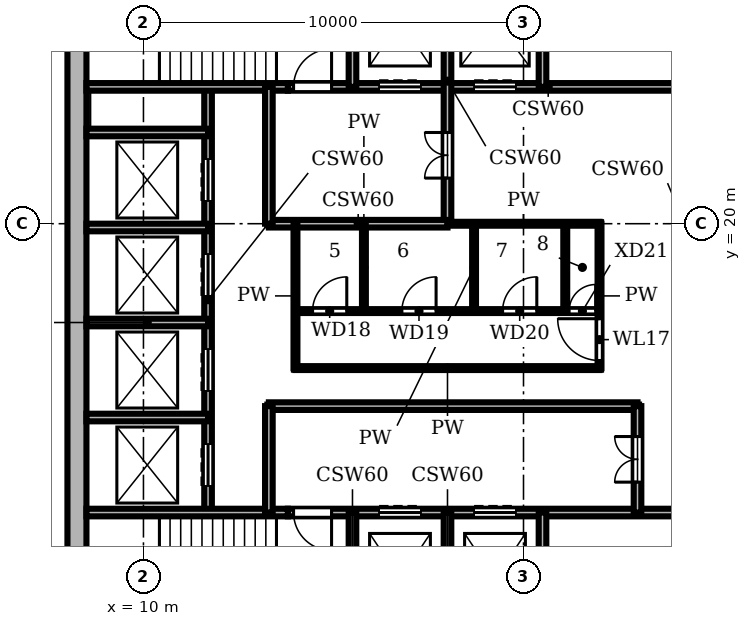
"""IFC4 building model, lengths in metres.
Left out: names, types, materials, properties, quantities, classifications, styles, units other than length and angle.
Written with IfcOpenShell. Run it as: python <this file> out.ifc"""

import sys

from ifc_helpers import new_model, si_unit, direction, frame, frame_2d, origin, place, context, subcontext, project, spatial, rectangle, extrude, element, fill, save


model = new_model("IFC4")
c1 = context("Model", 3, precision=1e-05, world=origin(), true_north=direction((0.0, 1.0)))
c2 = subcontext(c1, "Body", "Model", "MODEL_VIEW")
j1 = project(units=[si_unit("LENGTHUNIT", "METRE"), si_unit("PLANEANGLEUNIT", "RADIAN")], contexts=[c1])
p1 = place(None, origin())
s1 = spatial("IfcSite", under=j1, at=p1, CompositionType="ELEMENT")
p2 = place(p1, origin())
s2 = spatial("IfcBuilding", under=s1, at=p2, CompositionType="ELEMENT")
p3 = place(p2, frame((0.0, 0.0, 313.8)))
s3 = spatial("IfcBuildingStorey", under=s2, at=p3, CompositionType="ELEMENT", Elevation=313.8)
p4 = place(p3, frame((8.25, 27.5, 0.0), z_axis=(0.0, 0.0, 1.0), x_axis=(0.0, -1.0, 0.0)))
e1 = element("IfcWall", 1, at=p4, inside=s3, PredefinedType="SHEAR", context=c2, shape_type="SweptSolid", body=[
    extrude(rectangle(XDim=19.0, YDim=0.5, at=frame_2d((9.5, 0.0))), origin(), (0.0, 0.0, 1.0), 3.9),
])
p5 = place(p3, frame((8.5, 12.4, 0.0), z_axis=(0.0, 0.0, 1.0), x_axis=(1.0, 0.0, 0.0)))
e2 = element("IfcWall", 2, at=p5, inside=s3, PredefinedType="SHEAR", context=c2, shape_type="SweptSolid", body=[
    extrude(rectangle(XDim=5.3, YDim=0.2, at=frame_2d((2.65, 0.0))), origin(), (0.0, 0.0, 1.0), 3.58),
])
p6 = place(p3, frame((13.8, 12.4, 0.0), z_axis=(0.0, 0.0, 1.0), x_axis=(1.0, 0.0, 0.0)))
e3 = element("IfcWall", 3, at=p6, inside=s3, PredefinedType="SHEAR", context=c2, shape_type="SweptSolid", body=[
    extrude(rectangle(XDim=13.7, YDim=0.2, at=frame_2d((6.85, 0.0))), origin(), (0.0, 0.0, 1.0), 3.58),
])
p7 = place(p6, frame((2.4, 0.0, 0.0)))
e4 = element("IfcOpeningElement", 4, at=p7, cuts=e3, PredefinedType="OPENING", context=c2, shape_type="SweptSolid", body=[
    extrude(rectangle(XDim=1.1, YDim=2.1, at=frame_2d((0.55, 1.05))), frame((0.0, 0.11, 0.0), z_axis=(0.0, -1.0, 0.0), x_axis=(1.0, 0.0, 0.0)), (0.0, 0.0, 1.0), 0.22),
])
p8 = place(p6, frame((4.9, 0.0, 0.0)))
e5 = element("IfcOpeningElement", 5, at=p8, cuts=e3, PredefinedType="OPENING", context=c2, shape_type="SweptSolid", body=[
    extrude(rectangle(XDim=1.1, YDim=2.1, at=frame_2d((0.55, 1.05))), frame((0.0, 0.11, 0.0), z_axis=(0.0, -1.0, 0.0), x_axis=(1.0, 0.0, 0.0)), (0.0, 0.0, 1.0), 0.22),
])
p9 = place(p6, frame((0.15, 0.0, 0.0)))
e6 = element("IfcOpeningElement", 6, at=p9, cuts=e3, PredefinedType="OPENING", context=c2, shape_type="SweptSolid", body=[
    extrude(rectangle(XDim=1.0, YDim=2.1, at=frame_2d((0.5, 1.05))), frame((0.0, 0.11, 0.0), z_axis=(0.0, -1.0, 0.0), x_axis=(1.0, 0.0, 0.0)), (0.0, 0.0, 1.0), 0.22),
])
p10 = place(p3, frame((8.5, 14.9, 0.0), z_axis=(0.0, 0.0, 1.0), x_axis=(1.0, 0.0, 0.0)))
e7 = element("IfcWall", 7, at=p10, inside=s3, PredefinedType="SHEAR", context=c2, shape_type="SweptSolid", body=[
    extrude(rectangle(XDim=3.2, YDim=0.2, at=frame_2d((1.6, 0.0))), origin(), (0.0, 0.0, 1.0), 3.58),
])
p11 = place(p3, frame((13.3, 15.2, 0.0), z_axis=(0.0, 0.0, 1.0), x_axis=(1.0, 0.0, 0.0)))
e8 = element("IfcWall", 8, at=p11, inside=s3, PredefinedType="SHEAR", context=c2, shape_type="SweptSolid", body=[
    extrude(rectangle(XDim=9.7, YDim=0.2, at=frame_2d((4.85, 0.0))), origin(), (0.0, 0.0, 1.0), 3.58),
])
p12 = place(p3, frame((14.0, 16.2, 0.0), z_axis=(0.0, 0.0, 1.0), x_axis=(1.0, 0.0, 0.0)))
e9 = element("IfcWall", 9, at=p12, inside=s3, PredefinedType="PARTITIONING", context=c2, shape_type="SweptSolid", body=[
    extrude(rectangle(XDim=8.0, YDim=0.1, at=frame_2d((4.0, 0.0))), origin(), (0.0, 0.0, 1.0), 3.58),
])
p13 = place(p3, frame((8.5, 17.4, 0.0), z_axis=(0.0, 0.0, 1.0), x_axis=(1.0, 0.0, 0.0)))
e10 = element("IfcWall", 10, at=p13, inside=s3, PredefinedType="SHEAR", context=c2, shape_type="SweptSolid", body=[
    extrude(rectangle(XDim=3.2, YDim=0.2, at=frame_2d((1.6, 0.0))), origin(), (0.0, 0.0, 1.0), 3.58),
])
p14 = place(p3, frame((14.0, 17.7, 0.0), z_axis=(0.0, 0.0, 1.0), x_axis=(1.0, 0.0, 0.0)))
e11 = element("IfcWall", 11, at=p14, inside=s3, PredefinedType="PARTITIONING", context=c2, shape_type="SweptSolid", body=[
    extrude(rectangle(XDim=8.0, YDim=0.1, at=frame_2d((4.0, 0.0))), origin(), (0.0, 0.0, 1.0), 3.58),
])
p15 = place(p14, frame((0.45, 0.0, 0.0)))
e12 = element("IfcOpeningElement", 12, at=p15, cuts=e11, PredefinedType="OPENING", context=c2, shape_type="SweptSolid", body=[
    extrude(rectangle(XDim=0.9, YDim=2.1, at=frame_2d((0.45, 1.05))), frame((0.0, 0.06, 0.0), z_axis=(0.0, -1.0, 0.0), x_axis=(1.0, 0.0, 0.0)), (0.0, 0.0, 1.0), 0.12),
])
p16 = place(p14, frame((2.8, 0.0, 0.0)))
e13 = element("IfcOpeningElement", 13, at=p16, cuts=e11, PredefinedType="OPENING", context=c2, shape_type="SweptSolid", body=[
    extrude(rectangle(XDim=0.9, YDim=2.1, at=frame_2d((0.45, 1.05))), frame((0.0, 0.06, 0.0), z_axis=(0.0, -1.0, 0.0), x_axis=(1.0, 0.0, 0.0)), (0.0, 0.0, 1.0), 0.12),
])
p17 = place(p14, frame((5.45, 0.0, 0.0)))
e14 = element("IfcOpeningElement", 14, at=p17, cuts=e11, PredefinedType="OPENING", context=c2, shape_type="SweptSolid", body=[
    extrude(rectangle(XDim=0.9, YDim=2.1, at=frame_2d((0.45, 1.05))), frame((0.0, 0.06, 0.0), z_axis=(0.0, -1.0, 0.0), x_axis=(1.0, 0.0, 0.0)), (0.0, 0.0, 1.0), 0.12),
])
p18 = place(p14, frame((7.2, 0.0, 0.0)))
e15 = element("IfcOpeningElement", 15, at=p18, cuts=e11, PredefinedType="OPENING", context=c2, shape_type="SweptSolid", body=[
    extrude(rectangle(XDim=0.7, YDim=2.1, at=frame_2d((0.35, 1.05))), frame((0.0, 0.06, 0.0), z_axis=(0.0, -1.0, 0.0), x_axis=(1.0, 0.0, 0.0)), (0.0, 0.0, 1.0), 0.12),
])
p19 = place(p3, frame((8.5, 19.9, 0.0), z_axis=(0.0, 0.0, 1.0), x_axis=(1.0, 0.0, 0.0)))
e16 = element("IfcWall", 16, at=p19, inside=s3, PredefinedType="SHEAR", context=c2, shape_type="SweptSolid", body=[
    extrude(rectangle(XDim=3.2, YDim=0.2, at=frame_2d((1.6, 0.0))), origin(), (0.0, 0.0, 1.0), 3.58),
])
p20 = place(p3, frame((18.0, 20.0, 0.0), z_axis=(0.0, 0.0, 1.0), x_axis=(1.0, 0.0, 0.0)))
e17 = element("IfcWall", 17, at=p20, inside=s3, PredefinedType="PARTITIONING", context=c2, shape_type="SweptSolid", body=[
    extrude(rectangle(XDim=4.0, YDim=0.1, at=frame_2d((2.0, 0.0))), origin(), (0.0, 0.0, 1.0), 3.58),
])
p21 = place(p3, frame((13.3, 20.0, 0.0), z_axis=(0.0, 0.0, 1.0), x_axis=(1.0, 0.0, 0.0)))
e18 = element("IfcWall", 18, at=p21, inside=s3, PredefinedType="SHEAR", context=c2, shape_type="SweptSolid", body=[
    extrude(rectangle(XDim=4.7, YDim=0.2, at=frame_2d((2.35, 0.0))), origin(), (0.0, 0.0, 1.0), 3.58),
])
p22 = place(p3, frame((8.5, 22.4, 0.0), z_axis=(0.0, 0.0, 1.0), x_axis=(1.0, 0.0, 0.0)))
e19 = element("IfcWall", 19, at=p22, inside=s3, PredefinedType="SHEAR", context=c2, shape_type="SweptSolid", body=[
    extrude(rectangle(XDim=3.2, YDim=0.2, at=frame_2d((1.6, 0.0))), origin(), (0.0, 0.0, 1.0), 3.58),
])
p23 = place(p3, frame((8.5, 23.6, 0.0), z_axis=(0.0, 0.0, 1.0), x_axis=(1.0, 0.0, 0.0)))
e20 = element("IfcWall", 20, at=p23, inside=s3, PredefinedType="SHEAR", context=c2, shape_type="SweptSolid", body=[
    extrude(rectangle(XDim=5.3, YDim=0.2, at=frame_2d((2.65, 0.0))), origin(), (0.0, 0.0, 1.0), 3.58),
])
p24 = place(p3, frame((13.8, 23.6, 0.0), z_axis=(0.0, 0.0, 1.0), x_axis=(1.0, 0.0, 0.0)))
e21 = element("IfcWall", 21, at=p24, inside=s3, PredefinedType="SHEAR", context=c2, shape_type="SweptSolid", body=[
    extrude(rectangle(XDim=13.7, YDim=0.2, at=frame_2d((6.85, 0.0))), origin(), (0.0, 0.0, 1.0), 3.58),
])
p25 = place(p24, frame((2.4, 0.0, 0.0)))
e22 = element("IfcOpeningElement", 22, at=p25, cuts=e21, PredefinedType="OPENING", context=c2, shape_type="SweptSolid", body=[
    extrude(rectangle(XDim=1.1, YDim=2.1, at=frame_2d((0.55, 1.05))), frame((0.0, 0.11, 0.0), z_axis=(0.0, -1.0, 0.0), x_axis=(1.0, 0.0, 0.0)), (0.0, 0.0, 1.0), 0.22),
])
p26 = place(p24, frame((4.9, 0.0, 0.0)))
e23 = element("IfcOpeningElement", 23, at=p26, cuts=e21, PredefinedType="OPENING", context=c2, shape_type="SweptSolid", body=[
    extrude(rectangle(XDim=1.1, YDim=2.1, at=frame_2d((0.55, 1.05))), frame((0.0, 0.11, 0.0), z_axis=(0.0, -1.0, 0.0), x_axis=(1.0, 0.0, 0.0)), (0.0, 0.0, 1.0), 0.22),
])
p27 = place(p24, frame((0.15, 0.0, 0.0)))
e24 = element("IfcOpeningElement", 24, at=p27, cuts=e21, PredefinedType="OPENING", context=c2, shape_type="SweptSolid", body=[
    extrude(rectangle(XDim=1.0, YDim=2.1, at=frame_2d((0.5, 1.05))), frame((0.0, 0.11, 0.0), z_axis=(0.0, -1.0, 0.0), x_axis=(1.0, 0.0, 0.0)), (0.0, 0.0, 1.0), 0.22),
])
p28 = place(p3, frame((11.7, 12.4, 0.0), z_axis=(0.0, 0.0, 1.0), x_axis=(0.0, 1.0, 0.0)))
e25 = element("IfcWall", 25, at=p28, inside=s3, PredefinedType="SHEAR", context=c2, shape_type="SweptSolid", body=[
    extrude(rectangle(XDim=11.2, YDim=0.2, at=frame_2d((5.6, 0.0))), origin(), (0.0, 0.0, 1.0), 3.58),
])
p29 = place(p28, frame((0.7, 0.0, 0.0)))
e26 = element("IfcOpeningElement", 26, at=p29, cuts=e25, PredefinedType="OPENING", context=c2, shape_type="SweptSolid", body=[
    extrude(rectangle(XDim=1.1, YDim=2.1, at=frame_2d((0.55, 1.05))), frame((0.0, 0.11, 0.0), z_axis=(0.0, -1.0, 0.0), x_axis=(1.0, 0.0, 0.0)), (0.0, 0.0, 1.0), 0.22),
])
p30 = place(p28, frame((3.2, 0.0, 0.0)))
e27 = element("IfcOpeningElement", 27, at=p30, cuts=e25, PredefinedType="OPENING", context=c2, shape_type="SweptSolid", body=[
    extrude(rectangle(XDim=1.1, YDim=2.1, at=frame_2d((0.55, 1.05))), frame((0.0, 0.11, 0.0), z_axis=(0.0, -1.0, 0.0), x_axis=(1.0, 0.0, 0.0)), (0.0, 0.0, 1.0), 0.22),
])
p31 = place(p28, frame((5.7, 0.0, 0.0)))
e28 = element("IfcOpeningElement", 28, at=p31, cuts=e25, PredefinedType="OPENING", context=c2, shape_type="SweptSolid", body=[
    extrude(rectangle(XDim=1.1, YDim=2.1, at=frame_2d((0.55, 1.05))), frame((0.0, 0.11, 0.0), z_axis=(0.0, -1.0, 0.0), x_axis=(1.0, 0.0, 0.0)), (0.0, 0.0, 1.0), 0.22),
])
p32 = place(p28, frame((8.2, 0.0, 0.0)))
e29 = element("IfcOpeningElement", 29, at=p32, cuts=e25, PredefinedType="OPENING", context=c2, shape_type="SweptSolid", body=[
    extrude(rectangle(XDim=1.1, YDim=2.1, at=frame_2d((0.55, 1.05))), frame((0.0, 0.11, 0.0), z_axis=(0.0, -1.0, 0.0), x_axis=(1.0, 0.0, 0.0)), (0.0, 0.0, 1.0), 0.22),
])
p33 = place(p3, frame((13.3, 12.4, 0.0), z_axis=(0.0, 0.0, 1.0), x_axis=(0.0, 1.0, 0.0)))
e30 = element("IfcWall", 30, at=p33, inside=s3, PredefinedType="SHEAR", context=c2, shape_type="SweptSolid", body=[
    extrude(rectangle(XDim=2.8, YDim=0.2, at=frame_2d((1.4, 0.0))), origin(), (0.0, 0.0, 1.0), 3.58),
])
p34 = place(p3, frame((13.3, 20.0, 0.0), z_axis=(0.0, 0.0, 1.0), x_axis=(0.0, 1.0, 0.0)))
e31 = element("IfcWall", 31, at=p34, inside=s3, PredefinedType="SHEAR", context=c2, shape_type="SweptSolid", body=[
    extrude(rectangle(XDim=3.6, YDim=0.2, at=frame_2d((1.8, 0.0))), origin(), (0.0, 0.0, 1.0), 3.58),
])
p35 = place(p3, frame((14.0, 16.2, 0.0), z_axis=(0.0, 0.0, 1.0), x_axis=(0.0, 1.0, 0.0)))
e32 = element("IfcWall", 32, at=p35, inside=s3, PredefinedType="PARTITIONING", context=c2, shape_type="SweptSolid", body=[
    extrude(rectangle(XDim=3.8, YDim=0.1, at=frame_2d((1.9, 0.0))), origin(), (0.0, 0.0, 1.0), 3.58),
])
for number, where, z_axis, x_axis in (
    (33, (15.5, 8.5, 0.0), (0.0, 0.0, 1.0), (0.0, 1.0, 0.0)),
    (34, (15.5, 23.6, 0.0), (0.0, 0.0, 1.0), (0.0, 1.0, 0.0)),
):
    element("IfcWall", number, at=place(p3, frame(where, z_axis=z_axis, x_axis=x_axis)), inside=s3, PredefinedType="SHEAR", context=c2, shape_type="SweptSolid", body=[
        extrude(rectangle(XDim=3.9, YDim=0.2, at=frame_2d((1.95, 0.0))), origin(), (0.0, 0.0, 1.0), 3.58),
    ])
p36 = place(p3, frame((15.8, 17.7, 0.0), z_axis=(0.0, 0.0, 1.0), x_axis=(0.0, 1.0, 0.0)))
e35 = element("IfcWall", 35, at=p36, inside=s3, PredefinedType="PARTITIONING", context=c2, shape_type="SweptSolid", body=[
    extrude(rectangle(XDim=2.3, YDim=0.1, at=frame_2d((1.15, 0.0))), origin(), (0.0, 0.0, 1.0), 3.58),
])
p37 = place(p3, frame((18.0, 8.5, 0.0), z_axis=(0.0, 0.0, 1.0), x_axis=(0.0, 1.0, 0.0)))
e36 = element("IfcWall", 36, at=p37, inside=s3, PredefinedType="SHEAR", context=c2, shape_type="SweptSolid", body=[
    extrude(rectangle(XDim=3.9, YDim=0.2, at=frame_2d((1.95, 0.0))), origin(), (0.0, 0.0, 1.0), 3.58),
])
p38 = place(p3, frame((18.0, 20.0, 0.0), z_axis=(0.0, 0.0, 1.0), x_axis=(0.0, 1.0, 0.0)))
e37 = element("IfcWall", 37, at=p38, inside=s3, PredefinedType="SHEAR", context=c2, shape_type="SweptSolid", body=[
    extrude(rectangle(XDim=7.5, YDim=0.2, at=frame_2d((3.75, 0.0))), origin(), (0.0, 0.0, 1.0), 3.58),
])
p39 = place(p38, frame((1.2, 0.0, 0.0)))
e38 = element("IfcOpeningElement", 38, at=p39, cuts=e37, PredefinedType="OPENING", context=c2, shape_type="SweptSolid", body=[
    extrude(rectangle(XDim=1.2, YDim=2.1, at=frame_2d((0.6, 1.05))), frame((0.0, 0.11, 0.0), z_axis=(0.0, -1.0, 0.0), x_axis=(1.0, 0.0, 0.0)), (0.0, 0.0, 1.0), 0.22),
])
p40 = place(p3, frame((18.7, 17.7, 0.0), z_axis=(0.0, 0.0, 1.0), x_axis=(0.0, 1.0, 0.0)))
e39 = element("IfcWall", 39, at=p40, inside=s3, PredefinedType="PARTITIONING", context=c2, shape_type="SweptSolid", body=[
    extrude(rectangle(XDim=2.3, YDim=0.1, at=frame_2d((1.15, 0.0))), origin(), (0.0, 0.0, 1.0), 3.58),
])
for number, where, z_axis, x_axis in (
    (40, (20.5, 8.5, 0.0), (0.0, 0.0, 1.0), (0.0, 1.0, 0.0)),
    (41, (20.5, 23.6, 0.0), (0.0, 0.0, 1.0), (0.0, 1.0, 0.0)),
):
    element("IfcWall", number, at=place(p3, frame(where, z_axis=z_axis, x_axis=x_axis)), inside=s3, PredefinedType="SHEAR", context=c2, shape_type="SweptSolid", body=[
        extrude(rectangle(XDim=3.9, YDim=0.2, at=frame_2d((1.95, 0.0))), origin(), (0.0, 0.0, 1.0), 3.58),
    ])
p41 = place(p3, frame((21.1, 17.7, 0.0), z_axis=(0.0, 0.0, 1.0), x_axis=(0.0, 1.0, 0.0)))
e42 = element("IfcWall", 42, at=p41, inside=s3, PredefinedType="PARTITIONING", context=c2, shape_type="SweptSolid", body=[
    extrude(rectangle(XDim=2.3, YDim=0.1, at=frame_2d((1.15, 0.0))), origin(), (0.0, 0.0, 1.0), 3.58),
])
p42 = place(p3, frame((22.0, 16.2, 0.0), z_axis=(0.0, 0.0, 1.0), x_axis=(0.0, 1.0, 0.0)))
e43 = element("IfcWall", 43, at=p42, inside=s3, PredefinedType="PARTITIONING", context=c2, shape_type="SweptSolid", body=[
    extrude(rectangle(XDim=3.8, YDim=0.1, at=frame_2d((1.9, 0.0))), origin(), (0.0, 0.0, 1.0), 3.58),
])
p43 = place(p42, frame((0.2, 0.0, 0.0)))
e44 = element("IfcOpeningElement", 44, at=p43, cuts=e43, PredefinedType="OPENING", context=c2, shape_type="SweptSolid", body=[
    extrude(rectangle(XDim=1.1, YDim=2.1, at=frame_2d((0.55, 1.05))), frame((0.0, 0.06, 0.0), z_axis=(0.0, -1.0, 0.0), x_axis=(1.0, 0.0, 0.0)), (0.0, 0.0, 1.0), 0.12),
])
p44 = place(p3, frame((23.0, 12.4, 0.0), z_axis=(0.0, 0.0, 1.0), x_axis=(0.0, 1.0, 0.0)))
e45 = element("IfcWall", 45, at=p44, inside=s3, PredefinedType="SHEAR", context=c2, shape_type="SweptSolid", body=[
    extrude(rectangle(XDim=2.8, YDim=0.2, at=frame_2d((1.4, 0.0))), origin(), (0.0, 0.0, 1.0), 3.58),
])
p45 = place(p44, frame((0.8, 0.0, 0.0)))
e46 = element("IfcOpeningElement", 46, at=p45, cuts=e45, PredefinedType="OPENING", context=c2, shape_type="SweptSolid", body=[
    extrude(rectangle(XDim=1.2, YDim=2.1, at=frame_2d((0.6, 1.05))), frame((0.0, 0.11, 0.0), z_axis=(0.0, -1.0, 0.0), x_axis=(1.0, 0.0, 0.0)), (0.0, 0.0, 1.0), 0.22),
])
p46 = place(p29, origin())
e47 = element("IfcDoor", 47, at=p46, inside=s3, OperationType="DOUBLE_DOOR_SLIDING", PredefinedType="DOOR", context=c2, shape_type="SweptSolid", body=[
    extrude(rectangle(XDim=1.1, YDim=2.1, at=frame_2d((0.55, 1.05))), frame((0.0, 0.025, 0.0), z_axis=(0.0, -1.0, 0.0), x_axis=(1.0, 0.0, 0.0)), (0.0, 0.0, 1.0), 0.05),
])
fill(e26, e47)
p47 = place(p30, origin())
e48 = element("IfcDoor", 48, at=p47, inside=s3, OperationType="DOUBLE_DOOR_SLIDING", PredefinedType="DOOR", context=c2, shape_type="SweptSolid", body=[
    extrude(rectangle(XDim=1.1, YDim=2.1, at=frame_2d((0.55, 1.05))), frame((0.0, 0.025, 0.0), z_axis=(0.0, -1.0, 0.0), x_axis=(1.0, 0.0, 0.0)), (0.0, 0.0, 1.0), 0.05),
])
fill(e27, e48)
p48 = place(p31, origin())
e49 = element("IfcDoor", 49, at=p48, inside=s3, OperationType="DOUBLE_DOOR_SLIDING", PredefinedType="DOOR", context=c2, shape_type="SweptSolid", body=[
    extrude(rectangle(XDim=1.1, YDim=2.1, at=frame_2d((0.55, 1.05))), frame((0.0, 0.025, 0.0), z_axis=(0.0, -1.0, 0.0), x_axis=(1.0, 0.0, 0.0)), (0.0, 0.0, 1.0), 0.05),
])
fill(e28, e49)
p49 = place(p32, origin())
e50 = element("IfcDoor", 50, at=p49, inside=s3, OperationType="DOUBLE_DOOR_SLIDING", PredefinedType="DOOR", context=c2, shape_type="SweptSolid", body=[
    extrude(rectangle(XDim=1.1, YDim=2.1, at=frame_2d((0.55, 1.05))), frame((0.0, 0.025, 0.0), z_axis=(0.0, -1.0, 0.0), x_axis=(1.0, 0.0, 0.0)), (0.0, 0.0, 1.0), 0.05),
])
fill(e29, e50)
p50 = place(p7, origin())
e51 = element("IfcDoor", 51, at=p50, inside=s3, OperationType="DOUBLE_DOOR_SLIDING", PredefinedType="DOOR", context=c2, shape_type="SweptSolid", body=[
    extrude(rectangle(XDim=1.1, YDim=2.1, at=frame_2d((0.55, 1.05))), frame((0.0, 0.025, 0.0), z_axis=(0.0, -1.0, 0.0), x_axis=(1.0, 0.0, 0.0)), (0.0, 0.0, 1.0), 0.05),
])
fill(e4, e51)
p51 = place(p8, origin())
e52 = element("IfcDoor", 52, at=p51, inside=s3, OperationType="DOUBLE_DOOR_SLIDING", PredefinedType="DOOR", context=c2, shape_type="SweptSolid", body=[
    extrude(rectangle(XDim=1.1, YDim=2.1, at=frame_2d((0.55, 1.05))), frame((0.0, 0.025, 0.0), z_axis=(0.0, -1.0, 0.0), x_axis=(1.0, 0.0, 0.0)), (0.0, 0.0, 1.0), 0.05),
])
fill(e5, e52)
p52 = place(p25, origin())
e53 = element("IfcDoor", 53, at=p52, inside=s3, OperationType="DOUBLE_DOOR_SLIDING", PredefinedType="DOOR", context=c2, shape_type="SweptSolid", body=[
    extrude(rectangle(XDim=1.1, YDim=2.1, at=frame_2d((0.55, 1.05))), frame((0.0, 0.025, 0.0), z_axis=(0.0, -1.0, 0.0), x_axis=(1.0, 0.0, 0.0)), (0.0, 0.0, 1.0), 0.05),
])
fill(e22, e53)
p53 = place(p26, origin())
e54 = element("IfcDoor", 54, at=p53, inside=s3, OperationType="DOUBLE_DOOR_SLIDING", PredefinedType="DOOR", context=c2, shape_type="SweptSolid", body=[
    extrude(rectangle(XDim=1.1, YDim=2.1, at=frame_2d((0.55, 1.05))), frame((0.0, 0.025, 0.0), z_axis=(0.0, -1.0, 0.0), x_axis=(1.0, 0.0, 0.0)), (0.0, 0.0, 1.0), 0.05),
])
fill(e23, e54)
p54 = place(p9, frame((1.0, 0.0, 0.0), z_axis=(0.0, 0.0, 1.0), x_axis=(-1.0, 0.0, 0.0)))
e55 = element("IfcDoor", 55, at=p54, inside=s3, OperationType="SINGLE_SWING_LEFT", PredefinedType="DOOR", context=c2, shape_type="SweptSolid", body=[
    extrude(rectangle(XDim=1.0, YDim=2.1, at=frame_2d((0.5, 1.05))), frame((0.0, 0.025, 0.0), z_axis=(0.0, -1.0, 0.0), x_axis=(1.0, 0.0, 0.0)), (0.0, 0.0, 1.0), 0.05),
])
fill(e6, e55)
p55 = place(p27, origin())
e56 = element("IfcDoor", 56, at=p55, inside=s3, OperationType="SINGLE_SWING_RIGHT", PredefinedType="DOOR", context=c2, shape_type="SweptSolid", body=[
    extrude(rectangle(XDim=1.0, YDim=2.1, at=frame_2d((0.5, 1.05))), frame((0.0, 0.025, 0.0), z_axis=(0.0, -1.0, 0.0), x_axis=(1.0, 0.0, 0.0)), (0.0, 0.0, 1.0), 0.05),
])
fill(e24, e56)
p56 = place(p45, origin())
e57 = element("IfcDoor", 57, at=p56, inside=s3, OperationType="DOUBLE_DOOR_SINGLE_SWING", PredefinedType="DOOR", context=c2, shape_type="SweptSolid", body=[
    extrude(rectangle(XDim=1.2, YDim=2.1, at=frame_2d((0.6, 1.05))), frame((0.0, 0.025, 0.0), z_axis=(0.0, -1.0, 0.0), x_axis=(1.0, 0.0, 0.0)), (0.0, 0.0, 1.0), 0.05),
])
fill(e46, e57)
p57 = place(p39, origin())
e58 = element("IfcDoor", 58, at=p57, inside=s3, OperationType="DOUBLE_DOOR_SINGLE_SWING", PredefinedType="DOOR", context=c2, shape_type="SweptSolid", body=[
    extrude(rectangle(XDim=1.2, YDim=2.1, at=frame_2d((0.6, 1.05))), frame((0.0, 0.025, 0.0), z_axis=(0.0, -1.0, 0.0), x_axis=(1.0, 0.0, 0.0)), (0.0, 0.0, 1.0), 0.05),
])
fill(e38, e58)
p58 = place(p43, origin())
e59 = element("IfcDoor", 59, at=p58, inside=s3, OperationType="SINGLE_SWING_RIGHT", PredefinedType="DOOR", context=c2, shape_type="SweptSolid", body=[
    extrude(rectangle(XDim=1.1, YDim=2.1, at=frame_2d((0.55, 1.05))), frame((0.0, 0.025, 0.0), z_axis=(0.0, -1.0, 0.0), x_axis=(1.0, 0.0, 0.0)), (0.0, 0.0, 1.0), 0.05),
])
fill(e44, e59)
p59 = place(p15, origin())
e60 = element("IfcDoor", 60, at=p59, inside=s3, OperationType="SINGLE_SWING_RIGHT", PredefinedType="DOOR", context=c2, shape_type="SweptSolid", body=[
    extrude(rectangle(XDim=0.9, YDim=2.1, at=frame_2d((0.45, 1.05))), frame((0.0, 0.025, 0.0), z_axis=(0.0, -1.0, 0.0), x_axis=(1.0, 0.0, 0.0)), (0.0, 0.0, 1.0), 0.05),
])
fill(e12, e60)
p60 = place(p16, origin())
e61 = element("IfcDoor", 61, at=p60, inside=s3, OperationType="SINGLE_SWING_RIGHT", PredefinedType="DOOR", context=c2, shape_type="SweptSolid", body=[
    extrude(rectangle(XDim=0.9, YDim=2.1, at=frame_2d((0.45, 1.05))), frame((0.0, 0.025, 0.0), z_axis=(0.0, -1.0, 0.0), x_axis=(1.0, 0.0, 0.0)), (0.0, 0.0, 1.0), 0.05),
])
fill(e13, e61)
p61 = place(p17, origin())
e62 = element("IfcDoor", 62, at=p61, inside=s3, OperationType="SINGLE_SWING_RIGHT", PredefinedType="DOOR", context=c2, shape_type="SweptSolid", body=[
    extrude(rectangle(XDim=0.9, YDim=2.1, at=frame_2d((0.45, 1.05))), frame((0.0, 0.025, 0.0), z_axis=(0.0, -1.0, 0.0), x_axis=(1.0, 0.0, 0.0)), (0.0, 0.0, 1.0), 0.05),
])
fill(e14, e62)
p62 = place(p18, origin())
e63 = element("IfcDoor", 63, at=p62, inside=s3, OperationType="SINGLE_SWING_RIGHT", PredefinedType="DOOR", context=c2, shape_type="SweptSolid", body=[
    extrude(rectangle(XDim=0.7, YDim=2.1, at=frame_2d((0.35, 1.05))), frame((0.0, 0.025, 0.0), z_axis=(0.0, -1.0, 0.0), x_axis=(1.0, 0.0, 0.0)), (0.0, 0.0, 1.0), 0.05),
])
fill(e15, e63)
save(model, sys.argv[1])
